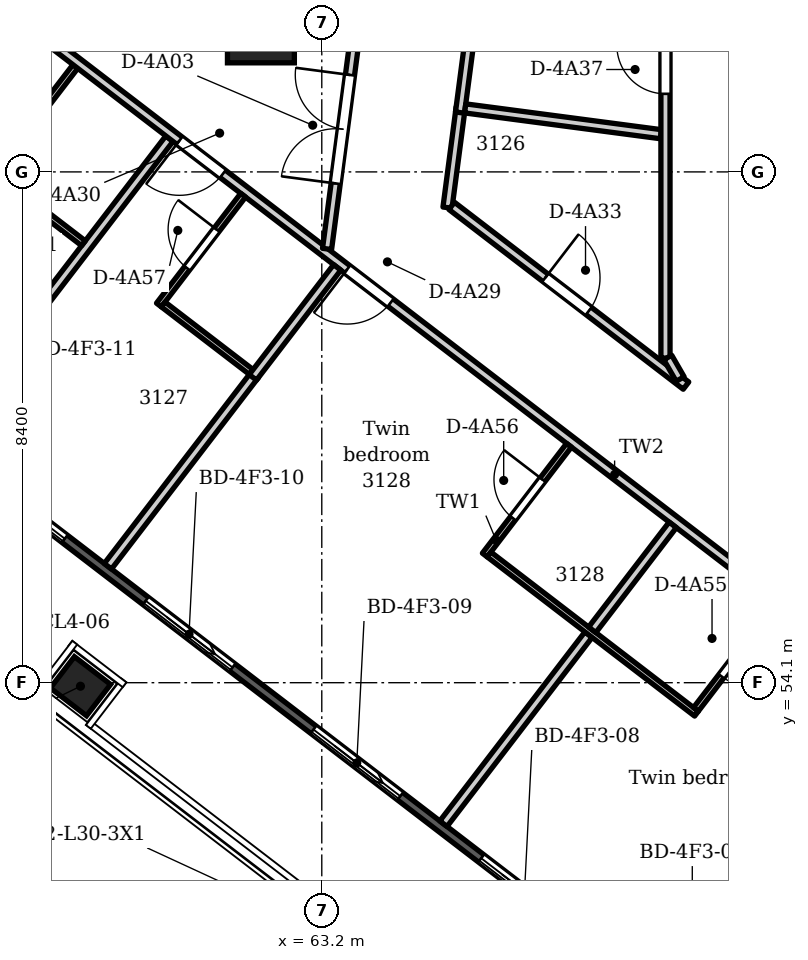
"""IFC4 building model, lengths in metres.
Left out: names, types, materials, properties, quantities, classifications, styles, units other than length and angle.
Written with IfcOpenShell. Run it as: python <this file> out.ifc"""

import sys

from ifc_helpers import new_model, si_unit, direction, frame, frame_2d, origin, origin_2d, place, context, subcontext, project, spatial, polyline, rectangle, circle, outline, extrude, element, fill, save


model = new_model("IFC4")
c1 = context("Model", 3, precision=1e-05, world=origin(), true_north=direction((0.0, 1.0)))
c2 = subcontext(c1, "Body", "Model", "MODEL_VIEW")
j1 = project(units=[si_unit("LENGTHUNIT", "METRE"), si_unit("PLANEANGLEUNIT", "RADIAN")], contexts=[c1])
p1 = place(None, origin())
s1 = spatial("IfcSite", under=j1, at=p1, CompositionType="ELEMENT")
p2 = place(p1, origin())
s2 = spatial("IfcBuilding", under=s1, at=p2, CompositionType="ELEMENT")
p3 = place(p2, frame((0.0, 0.0, 124.2)))
s3 = spatial("IfcBuildingStorey", under=s2, at=p3, CompositionType="ELEMENT", Elevation=124.2)
p4 = place(p3, frame((59.231, 54.042, -0.35), z_axis=(0.0, 0.0, 1.0), x_axis=(-0.793353340291, 0.608761429009, 0.0)))
e1 = element("IfcColumn", 1, at=p4, inside=s3, PredefinedType="COLUMN", context=c2, shape_type="SweptSolid", body=[
    extrude(rectangle(XDim=0.75, YDim=0.65, at=origin_2d()), origin(), (0.0, 0.0, 1.0), 3.95),
])
p5 = place(p3, frame((62.199, 64.844, -0.35), z_axis=(0.0, 0.0, 1.0), x_axis=(1.0, 0.0, 0.0)))
e2 = element("IfcColumn", 2, at=p5, inside=s3, PredefinedType="COLUMN", context=c2, shape_type="SweptSolid", body=[
    extrude(circle(Radius=0.55, at=origin_2d()), origin(), (0.0, 0.0, 1.0), 3.95),
])
p6 = place(p3, frame((87.225, 34.786, 0.0), z_axis=(0.0, 0.0, 1.0), x_axis=(-0.793353605974, 0.608761082764, 0.0)))
e3 = element("IfcWall", 3, at=p6, inside=s3, PredefinedType="SOLIDWALL", context=c2, shape_type="SweptSolid", body=[
    extrude(outline(polyline([(0.149, 0.075), (0.149, -0.075), (45.057, -0.075), (45.057, 0.075), (0.149, 0.075)])), origin(), (0.0, 0.0, 1.0), 3.3),
])
p7 = place(p6, frame((1.239, 0.0, 0.0)))
e4 = element("IfcOpeningElement", 4, at=p7, cuts=e3, PredefinedType="OPENING", context=c2, shape_type="SweptSolid", body=[
    extrude(rectangle(XDim=1.8, YDim=2.6, at=frame_2d((0.9, 1.3))), frame((0.0, 0.085, 0.0), z_axis=(0.0, -1.0, 0.0), x_axis=(1.0, 0.0, 0.0)), (0.0, 0.0, 1.0), 0.17),
])
p8 = place(p6, frame((4.316, 0.0, 0.0)))
e5 = element("IfcOpeningElement", 5, at=p8, cuts=e3, PredefinedType="OPENING", context=c2, shape_type="SweptSolid", body=[
    extrude(rectangle(XDim=1.8, YDim=2.6, at=frame_2d((0.9, 1.3))), frame((0.0, 0.085, 0.0), z_axis=(0.0, -1.0, 0.0), x_axis=(1.0, 0.0, 0.0)), (0.0, 0.0, 1.0), 0.17),
])
p9 = place(p6, frame((7.793, 0.0, 0.0)))
e6 = element("IfcOpeningElement", 6, at=p9, cuts=e3, PredefinedType="OPENING", context=c2, shape_type="SweptSolid", body=[
    extrude(rectangle(XDim=1.8, YDim=2.6, at=frame_2d((0.9, 1.3))), frame((0.0, 0.085, 0.0), z_axis=(0.0, -1.0, 0.0), x_axis=(1.0, 0.0, 0.0)), (0.0, 0.0, 1.0), 0.17),
])
p10 = place(p6, frame((11.271, 0.0, 0.0)))
e7 = element("IfcOpeningElement", 7, at=p10, cuts=e3, PredefinedType="OPENING", context=c2, shape_type="SweptSolid", body=[
    extrude(rectangle(XDim=1.8, YDim=2.6, at=frame_2d((0.9, 1.3))), frame((0.0, 0.085, 0.0), z_axis=(0.0, -1.0, 0.0), x_axis=(1.0, 0.0, 0.0)), (0.0, 0.0, 1.0), 0.17),
])
p11 = place(p6, frame((14.748, 0.0, 0.0)))
e8 = element("IfcOpeningElement", 8, at=p11, cuts=e3, PredefinedType="OPENING", context=c2, shape_type="SweptSolid", body=[
    extrude(rectangle(XDim=1.8, YDim=2.6, at=frame_2d((0.9, 1.3))), frame((0.0, 0.085, 0.0), z_axis=(0.0, -1.0, 0.0), x_axis=(1.0, 0.0, 0.0)), (0.0, 0.0, 1.0), 0.17),
])
p12 = place(p6, frame((18.226, 0.0, 0.0)))
e9 = element("IfcOpeningElement", 9, at=p12, cuts=e3, PredefinedType="OPENING", context=c2, shape_type="SweptSolid", body=[
    extrude(rectangle(XDim=1.8, YDim=2.6, at=frame_2d((0.9, 1.3))), frame((0.0, 0.085, 0.0), z_axis=(0.0, -1.0, 0.0), x_axis=(1.0, 0.0, 0.0)), (0.0, 0.0, 1.0), 0.17),
])
p13 = place(p6, frame((21.703, 0.0, 0.0)))
e10 = element("IfcOpeningElement", 10, at=p13, cuts=e3, PredefinedType="OPENING", context=c2, shape_type="SweptSolid", body=[
    extrude(rectangle(XDim=1.8, YDim=2.6, at=frame_2d((0.9, 1.3))), frame((0.0, 0.085, 0.0), z_axis=(0.0, -1.0, 0.0), x_axis=(1.0, 0.0, 0.0)), (0.0, 0.0, 1.0), 0.17),
])
p14 = place(p6, frame((25.18, 0.0, 0.0)))
e11 = element("IfcOpeningElement", 11, at=p14, cuts=e3, PredefinedType="OPENING", context=c2, shape_type="SweptSolid", body=[
    extrude(rectangle(XDim=1.8, YDim=2.6, at=frame_2d((0.9, 1.3))), frame((0.0, 0.085, 0.0), z_axis=(0.0, -1.0, 0.0), x_axis=(1.0, 0.0, 0.0)), (0.0, 0.0, 1.0), 0.17),
])
p15 = place(p6, frame((28.658, 0.0, 0.0)))
e12 = element("IfcOpeningElement", 12, at=p15, cuts=e3, PredefinedType="OPENING", context=c2, shape_type="SweptSolid", body=[
    extrude(rectangle(XDim=1.8, YDim=2.6, at=frame_2d((0.9, 1.3))), frame((0.0, 0.085, 0.0), z_axis=(0.0, -1.0, 0.0), x_axis=(1.0, 0.0, 0.0)), (0.0, 0.0, 1.0), 0.17),
])
p16 = place(p6, frame((32.135, 0.0, 0.0)))
e13 = element("IfcOpeningElement", 13, at=p16, cuts=e3, PredefinedType="OPENING", context=c2, shape_type="SweptSolid", body=[
    extrude(rectangle(XDim=1.8, YDim=2.6, at=frame_2d((0.9, 1.3))), frame((0.0, 0.085, 0.0), z_axis=(0.0, -1.0, 0.0), x_axis=(1.0, 0.0, 0.0)), (0.0, 0.0, 1.0), 0.17),
])
p17 = place(p6, frame((35.613, 0.0, 0.0)))
e14 = element("IfcOpeningElement", 14, at=p17, cuts=e3, PredefinedType="OPENING", context=c2, shape_type="SweptSolid", body=[
    extrude(rectangle(XDim=1.8, YDim=2.6, at=frame_2d((0.9, 1.3))), frame((0.0, 0.085, 0.0), z_axis=(0.0, -1.0, 0.0), x_axis=(1.0, 0.0, 0.0)), (0.0, 0.0, 1.0), 0.17),
])
p18 = place(p6, frame((39.09, 0.0, 0.0)))
e15 = element("IfcOpeningElement", 15, at=p18, cuts=e3, PredefinedType="OPENING", context=c2, shape_type="SweptSolid", body=[
    extrude(rectangle(XDim=1.8, YDim=2.6, at=frame_2d((0.9, 1.3))), frame((0.0, 0.085, 0.0), z_axis=(0.0, -1.0, 0.0), x_axis=(1.0, 0.0, 0.0)), (0.0, 0.0, 1.0), 0.17),
])
p19 = place(p6, frame((42.167, 0.0, 0.0)))
e16 = element("IfcOpeningElement", 16, at=p19, cuts=e3, PredefinedType="OPENING", context=c2, shape_type="SweptSolid", body=[
    extrude(rectangle(XDim=1.8, YDim=2.6, at=frame_2d((0.9, 1.3))), frame((0.0, 0.085, 0.0), z_axis=(0.0, -1.0, 0.0), x_axis=(1.0, 0.0, 0.0)), (0.0, 0.0, 1.0), 0.17),
])
p20 = place(p3, frame((56.924, 58.132, 0.0), z_axis=(0.0, 0.0, 1.0), x_axis=(0.608635904236, 0.793449643062, 0.0)))
e17 = element("IfcWall", 17, at=p20, inside=s3, PredefinedType="PARTITIONING", context=c2, shape_type="SweptSolid", body=[
    extrude(rectangle(XDim=6.194, YDim=0.15, at=frame_2d((3.097, 0.0))), origin(), (0.0, 0.0, 1.0), 3.3),
])
p21 = place(p3, frame((57.763, 62.428, 0.0), z_axis=(0.0, 0.0, 1.0), x_axis=(0.608652294224, 0.793437070432, 0.0)))
e18 = element("IfcWall", 18, at=p21, inside=s3, PredefinedType="PARTITIONING", context=c2, shape_type="SweptSolid", body=[
    extrude(rectangle(XDim=2.275, YDim=0.1, at=frame_2d((1.138, 0.0))), origin(), (0.0, 0.0, 1.0), 3.3),
])
p22 = place(p21, frame((0.762, 0.0, 0.0)))
e19 = element("IfcOpeningElement", 19, at=p22, cuts=e18, PredefinedType="OPENING", context=c2, shape_type="SweptSolid", body=[
    extrude(rectangle(XDim=0.8, YDim=2.1, at=frame_2d((0.4, 1.05))), frame((0.0, 0.06, 0.0), z_axis=(0.0, -1.0, 0.0), x_axis=(1.0, 0.0, 0.0)), (0.0, 0.0, 1.0), 0.12),
])
p23 = place(p3, frame((57.833, 62.438, 0.0), z_axis=(0.0, 0.0, 1.0), x_axis=(0.793369431695, -0.608740457709, 0.0)))
e20 = element("IfcWall", 20, at=p23, inside=s3, PredefinedType="PARTITIONING", context=c2, shape_type="SweptSolid", body=[
    extrude(rectangle(XDim=1.825, YDim=0.1, at=frame_2d((0.912, 0.0))), origin(), (0.0, 0.0, 1.0), 3.3),
])
p24 = place(p3, frame((58.042, 65.176, 0.0), z_axis=(0.0, 0.0, 1.0), x_axis=(0.793390311924, -0.608713243609, 0.0)))
e21 = element("IfcWall", 21, at=p24, inside=s3, PredefinedType="PARTITIONING", context=c2, shape_type="SweptSolid", body=[
    extrude(rectangle(XDim=17.064, YDim=0.15, at=frame_2d((8.532, 0.0))), origin(), (0.0, 0.0, 1.0), 2.8),
])
p25 = place(p24, frame((7.029, 0.0, 0.0)))
e22 = element("IfcOpeningElement", 22, at=p25, cuts=e21, PredefinedType="OPENING", context=c2, shape_type="SweptSolid", body=[
    extrude(rectangle(XDim=0.9, YDim=2.1, at=frame_2d((0.45, 1.05))), frame((0.0, 0.085, 0.0), z_axis=(0.0, -1.0, 0.0), x_axis=(1.0, 0.0, 0.0)), (0.0, 0.0, 1.0), 0.17),
])
p26 = place(p24, frame((3.551, 0.0, 0.0)))
e23 = element("IfcOpeningElement", 23, at=p26, cuts=e21, PredefinedType="OPENING", context=c2, shape_type="SweptSolid", body=[
    extrude(rectangle(XDim=0.9, YDim=2.1, at=frame_2d((0.45, 1.05))), frame((0.0, 0.085, 0.0), z_axis=(0.0, -1.0, 0.0), x_axis=(1.0, 0.0, 0.0)), (0.0, 0.0, 1.0), 0.17),
])
p27 = place(p3, frame((59.682, 56.015, 0.0), z_axis=(0.0, 0.0, 1.0), x_axis=(0.608733348698, 0.793374886282, 0.0)))
e24 = element("IfcWall", 24, at=p27, inside=s3, PredefinedType="PARTITIONING", context=c2, shape_type="SweptSolid", body=[
    extrude(rectangle(XDim=3.973, YDim=0.15, at=frame_2d((1.987, 0.0))), origin(), (0.0, 0.0, 1.0), 3.3),
])
p28 = place(p3, frame((60.521, 60.311, 0.0), z_axis=(0.0, 0.0, 1.0), x_axis=(0.608719842686, 0.793385248867, 0.0)))
e25 = element("IfcWall", 25, at=p28, inside=s3, PredefinedType="PARTITIONING", context=c2, shape_type="SweptSolid", body=[
    extrude(rectangle(XDim=2.275, YDim=0.1, at=frame_2d((1.138, 0.0))), origin(), (0.0, 0.0, 1.0), 3.3),
])
p29 = place(p28, frame((0.762, 0.0, 0.0)))
e26 = element("IfcOpeningElement", 26, at=p29, cuts=e25, PredefinedType="OPENING", context=c2, shape_type="SweptSolid", body=[
    extrude(rectangle(XDim=0.8, YDim=2.1, at=frame_2d((0.4, 1.05))), frame((0.0, 0.06, 0.0), z_axis=(0.0, -1.0, 0.0), x_axis=(1.0, 0.0, 0.0)), (0.0, 0.0, 1.0), 0.12),
])
p30 = place(p3, frame((60.592, 60.321, 0.0), z_axis=(0.0, 0.0, 1.0), x_axis=(0.793369431695, -0.608740457709, 0.0)))
e27 = element("IfcWall", 27, at=p30, inside=s3, PredefinedType="PARTITIONING", context=c2, shape_type="SweptSolid", body=[
    extrude(rectangle(XDim=1.825, YDim=0.1, at=frame_2d((0.912, 0.0))), origin(), (0.0, 0.0, 1.0), 3.3),
])
p31 = place(p3, frame((62.067, 59.121, 0.0), z_axis=(0.0, 0.0, 1.0), x_axis=(0.608570992326, 0.793499431191, 0.0)))
e28 = element("IfcWall", 28, at=p31, inside=s3, PredefinedType="PARTITIONING", context=c2, shape_type="SweptSolid", body=[
    extrude(rectangle(XDim=2.279, YDim=0.15, at=frame_2d((1.139, 0.0))), origin(), (0.0, 0.0, 1.0), 3.3),
])
p32 = place(p3, frame((63.287, 61.233, 0.0), z_axis=(0.0, 0.0, 1.0), x_axis=(0.130693367383, 0.991422838007, 0.0)))
e29 = element("IfcWall", 29, at=p32, inside=s3, PredefinedType="PARTITIONING", context=c2, shape_type="SweptSolid", body=[
    extrude(rectangle(XDim=3.437, YDim=0.15, at=frame_2d((1.719, 0.0))), origin(), (0.0, 0.0, 1.0), 2.7),
])
p33 = place(p32, frame((1.086, 0.0, 0.0)))
e30 = element("IfcOpeningElement", 30, at=p33, cuts=e29, PredefinedType="OPENING", context=c2, shape_type="SweptSolid", body=[
    extrude(rectangle(XDim=1.8, YDim=2.1, at=frame_2d((0.9, 1.05))), frame((0.0, 0.085, 0.0), z_axis=(0.0, -1.0, 0.0), x_axis=(1.0, 0.0, 0.0)), (0.0, 0.0, 1.0), 0.17),
])
p34 = place(p3, frame((65.2, 51.781, 0.0), z_axis=(0.0, 0.0, 1.0), x_axis=(0.608783231907, 0.793336609863, 0.0)))
e31 = element("IfcWall", 31, at=p34, inside=s3, PredefinedType="PARTITIONING", context=c2, shape_type="SweptSolid", body=[
    extrude(rectangle(XDim=3.92, YDim=0.15, at=frame_2d((1.96, 0.0))), origin(), (0.0, 0.0, 1.0), 3.3),
])
p35 = place(p3, frame((65.267, 61.913, 0.0), z_axis=(0.0, 0.0, 1.0), x_axis=(0.130621934677, 0.991432251937, 0.0)))
e32 = element("IfcWall", 32, at=p35, inside=s3, PredefinedType="PARTITIONING", context=c2, shape_type="SweptSolid", body=[
    extrude(rectangle(XDim=1.66, YDim=0.15, at=frame_2d((0.83, 0.0))), origin(), (0.0, 0.0, 1.0), 3.3),
])
p36 = place(p3, frame((65.336, 61.941, 0.0), z_axis=(0.0, 0.0, 1.0), x_axis=(0.79340079326, -0.608699582105, 0.0)))
e33 = element("IfcWall", 33, at=p36, inside=s3, PredefinedType="PARTITIONING", context=c2, shape_type="SweptSolid", body=[
    extrude(rectangle(XDim=4.856, YDim=0.15, at=frame_2d((2.428, 0.0))), origin(), (0.0, 0.0, 1.0), 3.3),
])
p37 = place(p36, frame((1.94, 0.0, 0.0)))
e34 = element("IfcOpeningElement", 34, at=p37, cuts=e33, PredefinedType="OPENING", context=c2, shape_type="SweptSolid", body=[
    extrude(rectangle(XDim=0.9, YDim=2.1, at=frame_2d((0.45, 1.05))), frame((0.0, 0.085, 0.0), z_axis=(0.0, -1.0, 0.0), x_axis=(1.0, 0.0, 0.0)), (0.0, 0.0, 1.0), 0.17),
])
p38 = place(p3, frame((65.473, 63.476, 0.0), z_axis=(0.0, 0.0, 1.0), x_axis=(0.130468344309, 0.991452475479, 0.0)))
e35 = element("IfcWall", 35, at=p38, inside=s3, PredefinedType="PARTITIONING", context=c2, shape_type="SweptSolid", body=[
    extrude(rectangle(XDim=2.283, YDim=0.15, at=frame_2d((1.142, 0.0))), origin(), (0.0, 0.0, 1.0), 2.7),
])
p39 = place(p3, frame((65.558, 63.544, 0.0), z_axis=(0.0, 0.0, 1.0), x_axis=(0.991425096487, -0.13067623371, 0.0)))
e36 = element("IfcWall", 36, at=p39, inside=s3, PredefinedType="PARTITIONING", context=c2, shape_type="SweptSolid", body=[
    extrude(rectangle(XDim=3.247, YDim=0.15, at=frame_2d((1.624, 0.0))), origin(), (0.0, 0.0, 1.0), 3.3),
])
p40 = place(p3, frame((65.881, 56.199, 0.0), z_axis=(0.0, 0.0, 1.0), x_axis=(0.608652294224, 0.793437070432, 0.0)))
e37 = element("IfcWall", 37, at=p40, inside=s3, PredefinedType="PARTITIONING", context=c2, shape_type="SweptSolid", body=[
    extrude(rectangle(XDim=2.275, YDim=0.1, at=frame_2d((1.138, 0.0))), origin(), (0.0, 0.0, 1.0), 3.3),
])
p41 = place(p40, frame((0.762, 0.0, 0.0)))
e38 = element("IfcOpeningElement", 38, at=p41, cuts=e37, PredefinedType="OPENING", context=c2, shape_type="SweptSolid", body=[
    extrude(rectangle(XDim=0.8, YDim=2.1, at=frame_2d((0.4, 1.05))), frame((0.0, 0.06, 0.0), z_axis=(0.0, -1.0, 0.0), x_axis=(1.0, 0.0, 0.0)), (0.0, 0.0, 1.0), 0.12),
])
p42 = place(p3, frame((65.951, 56.208, 0.0), z_axis=(0.0, 0.0, 1.0), x_axis=(0.793301035436, -0.60882958796, 0.0)))
e39 = element("IfcWall", 39, at=p42, inside=s3, PredefinedType="PARTITIONING", context=c2, shape_type="SweptSolid", body=[
    extrude(rectangle(XDim=4.3, YDim=0.1, at=frame_2d((2.15, 0.0))), origin(), (0.0, 0.0, 1.0), 3.3),
])
p43 = place(p3, frame((67.647, 54.97, 0.0), z_axis=(0.0, 0.0, 1.0), x_axis=(0.608674216197, 0.79342025342, 0.0)))
e40 = element("IfcWall", 40, at=p43, inside=s3, PredefinedType="PARTITIONING", context=c2, shape_type="SweptSolid", body=[
    extrude(rectangle(XDim=2.175, YDim=0.15, at=frame_2d((1.088, 0.0))), origin(), (0.0, 0.0, 1.0), 3.3),
])
p44 = place(p3, frame((68.852, 59.438, 0.0), z_axis=(0.0, 0.0, 1.0), x_axis=(0.0, 1.0, 0.0)))
e41 = element("IfcWall", 41, at=p44, inside=s3, PredefinedType="PARTITIONING", context=c2, shape_type="SweptSolid", body=[
    extrude(rectangle(XDim=5.82, YDim=0.15, at=frame_2d((2.91, 0.0))), origin(), (0.0, 0.0, 1.0), 2.7),
])
p45 = place(p44, frame((4.346, 0.0, 0.0)))
e42 = element("IfcOpeningElement", 42, at=p45, cuts=e41, PredefinedType="OPENING", context=c2, shape_type="SweptSolid", body=[
    extrude(rectangle(XDim=0.8, YDim=2.1, at=frame_2d((0.4, 1.05))), frame((0.0, 0.085, 0.0), z_axis=(0.0, -1.0, 0.0), x_axis=(1.0, 0.0, 0.0)), (0.0, 0.0, 1.0), 0.17),
])
p46 = place(p3, frame((68.889, 59.448, 0.0), z_axis=(0.0, 0.0, 1.0), x_axis=(0.499481060725, -0.866324806281, 0.0)))
e43 = element("IfcWall", 43, at=p46, inside=s3, PredefinedType="PARTITIONING", context=c2, shape_type="SweptSolid", body=[
    extrude(rectangle(XDim=0.409, YDim=0.15, at=frame_2d((0.204, 0.0))), origin(), (0.0, 0.0, 1.0), 3.3),
])
p47 = place(p3, frame((69.352, 53.661, 0.0), z_axis=(0.0, 0.0, 1.0), x_axis=(0.608744865415, 0.793366049709, 0.0)))
e44 = element("IfcWall", 44, at=p47, inside=s3, PredefinedType="PARTITIONING", context=c2, shape_type="SweptSolid", body=[
    extrude(rectangle(XDim=2.175, YDim=0.1, at=frame_2d((1.088, 0.0))), origin(), (0.0, 0.0, 1.0), 3.3),
])
p48 = place(p47, frame((0.688, 0.0, 0.0)))
e45 = element("IfcOpeningElement", 45, at=p48, cuts=e44, PredefinedType="OPENING", context=c2, shape_type="SweptSolid", body=[
    extrude(rectangle(XDim=0.8, YDim=2.1, at=frame_2d((0.4, 1.05))), frame((0.0, 0.06, 0.0), z_axis=(0.0, -1.0, 0.0), x_axis=(1.0, 0.0, 0.0)), (0.0, 0.0, 1.0), 0.12),
])
p49 = place(p14, origin())
e46 = element("IfcDoor", 46, at=p49, inside=s3, OperationType="SLIDING_TO_LEFT", PredefinedType="DOOR", context=c2, shape_type="SweptSolid", body=[
    extrude(rectangle(XDim=1.8, YDim=2.6, at=frame_2d((0.9, 1.3))), frame((0.0, 0.025, 0.0), z_axis=(0.0, -1.0, 0.0), x_axis=(1.0, 0.0, 0.0)), (0.0, 0.0, 1.0), 0.05),
])
fill(e11, e46)
p50 = place(p15, origin())
e47 = element("IfcDoor", 47, at=p50, inside=s3, OperationType="SLIDING_TO_LEFT", PredefinedType="DOOR", context=c2, shape_type="SweptSolid", body=[
    extrude(rectangle(XDim=1.8, YDim=2.6, at=frame_2d((0.9, 1.3))), frame((0.0, 0.025, 0.0), z_axis=(0.0, -1.0, 0.0), x_axis=(1.0, 0.0, 0.0)), (0.0, 0.0, 1.0), 0.05),
])
fill(e12, e47)
p51 = place(p16, origin())
e48 = element("IfcDoor", 48, at=p51, inside=s3, OperationType="SLIDING_TO_LEFT", PredefinedType="DOOR", context=c2, shape_type="SweptSolid", body=[
    extrude(rectangle(XDim=1.8, YDim=2.6, at=frame_2d((0.9, 1.3))), frame((0.0, 0.025, 0.0), z_axis=(0.0, -1.0, 0.0), x_axis=(1.0, 0.0, 0.0)), (0.0, 0.0, 1.0), 0.05),
])
fill(e13, e48)
p52 = place(p17, origin())
e49 = element("IfcDoor", 49, at=p52, inside=s3, OperationType="SLIDING_TO_LEFT", PredefinedType="DOOR", context=c2, shape_type="SweptSolid", body=[
    extrude(rectangle(XDim=1.8, YDim=2.6, at=frame_2d((0.9, 1.3))), frame((0.0, 0.025, 0.0), z_axis=(0.0, -1.0, 0.0), x_axis=(1.0, 0.0, 0.0)), (0.0, 0.0, 1.0), 0.05),
])
fill(e14, e49)
p53 = place(p33, origin())
e50 = element("IfcDoor", 50, at=p53, inside=s3, OperationType="DOUBLE_DOOR_DOUBLE_SWING", PredefinedType="DOOR", context=c2, shape_type="SweptSolid", body=[
    extrude(rectangle(XDim=1.8, YDim=2.1, at=frame_2d((0.9, 1.05))), frame((0.0, 0.025, 0.0), z_axis=(0.0, -1.0, 0.0), x_axis=(1.0, 0.0, 0.0)), (0.0, 0.0, 1.0), 0.05),
])
fill(e30, e50)
p54 = place(p25, frame((0.9, 0.0, 0.0), z_axis=(0.0, 0.0, 1.0), x_axis=(-1.0, 0.0, 0.0)))
e51 = element("IfcDoor", 51, at=p54, inside=s3, OperationType="SINGLE_SWING_RIGHT", PredefinedType="DOOR", context=c2, shape_type="SweptSolid", body=[
    extrude(rectangle(XDim=0.9, YDim=2.1, at=frame_2d((0.45, 1.05))), frame((0.0, 0.025, 0.0), z_axis=(0.0, -1.0, 0.0), x_axis=(1.0, 0.0, 0.0)), (0.0, 0.0, 1.0), 0.05),
])
fill(e22, e51)
p55 = place(p26, frame((0.9, 0.0, 0.0), z_axis=(0.0, 0.0, 1.0), x_axis=(-1.0, 0.0, 0.0)))
e52 = element("IfcDoor", 52, at=p55, inside=s3, OperationType="SINGLE_SWING_RIGHT", PredefinedType="DOOR", context=c2, shape_type="SweptSolid", body=[
    extrude(rectangle(XDim=0.9, YDim=2.1, at=frame_2d((0.45, 1.05))), frame((0.0, 0.025, 0.0), z_axis=(0.0, -1.0, 0.0), x_axis=(1.0, 0.0, 0.0)), (0.0, 0.0, 1.0), 0.05),
])
fill(e23, e52)
p56 = place(p37, origin())
e53 = element("IfcDoor", 53, at=p56, inside=s3, OperationType="SINGLE_SWING_LEFT", PredefinedType="DOOR", context=c2, shape_type="SweptSolid", body=[
    extrude(rectangle(XDim=0.9, YDim=2.1, at=frame_2d((0.45, 1.05))), frame((0.0, 0.025, 0.0), z_axis=(0.0, -1.0, 0.0), x_axis=(1.0, 0.0, 0.0)), (0.0, 0.0, 1.0), 0.05),
])
fill(e34, e53)
p57 = place(p45, origin())
e54 = element("IfcDoor", 54, at=p57, inside=s3, OperationType="SINGLE_SWING_RIGHT", PredefinedType="DOOR", context=c2, shape_type="SweptSolid", body=[
    extrude(rectangle(XDim=0.8, YDim=2.1, at=frame_2d((0.4, 1.05))), frame((0.0, 0.025, 0.0), z_axis=(0.0, -1.0, 0.0), x_axis=(1.0, 0.0, 0.0)), (0.0, 0.0, 1.0), 0.05),
])
fill(e42, e54)
p58 = place(p48, frame((0.8, 0.0, 0.0), z_axis=(0.0, 0.0, 1.0), x_axis=(-1.0, 0.0, 0.0)))
e55 = element("IfcDoor", 55, at=p58, inside=s3, OperationType="SINGLE_SWING_LEFT", PredefinedType="DOOR", context=c2, shape_type="SweptSolid", body=[
    extrude(rectangle(XDim=0.8, YDim=2.1, at=frame_2d((0.4, 1.05))), frame((0.0, 0.025, 0.0), z_axis=(0.0, -1.0, 0.0), x_axis=(1.0, 0.0, 0.0)), (0.0, 0.0, 1.0), 0.05),
])
fill(e45, e55)
p59 = place(p41, origin())
e56 = element("IfcDoor", 56, at=p59, inside=s3, OperationType="SINGLE_SWING_RIGHT", PredefinedType="DOOR", context=c2, shape_type="SweptSolid", body=[
    extrude(rectangle(XDim=0.8, YDim=2.1, at=frame_2d((0.4, 1.05))), frame((0.0, 0.025, 0.0), z_axis=(0.0, -1.0, 0.0), x_axis=(1.0, 0.0, 0.0)), (0.0, 0.0, 1.0), 0.05),
])
fill(e38, e56)
p60 = place(p29, origin())
e57 = element("IfcDoor", 57, at=p60, inside=s3, OperationType="SINGLE_SWING_RIGHT", PredefinedType="DOOR", context=c2, shape_type="SweptSolid", body=[
    extrude(rectangle(XDim=0.8, YDim=2.1, at=frame_2d((0.4, 1.05))), frame((0.0, 0.025, 0.0), z_axis=(0.0, -1.0, 0.0), x_axis=(1.0, 0.0, 0.0)), (0.0, 0.0, 1.0), 0.05),
])
fill(e26, e57)
save(model, sys.argv[1])
